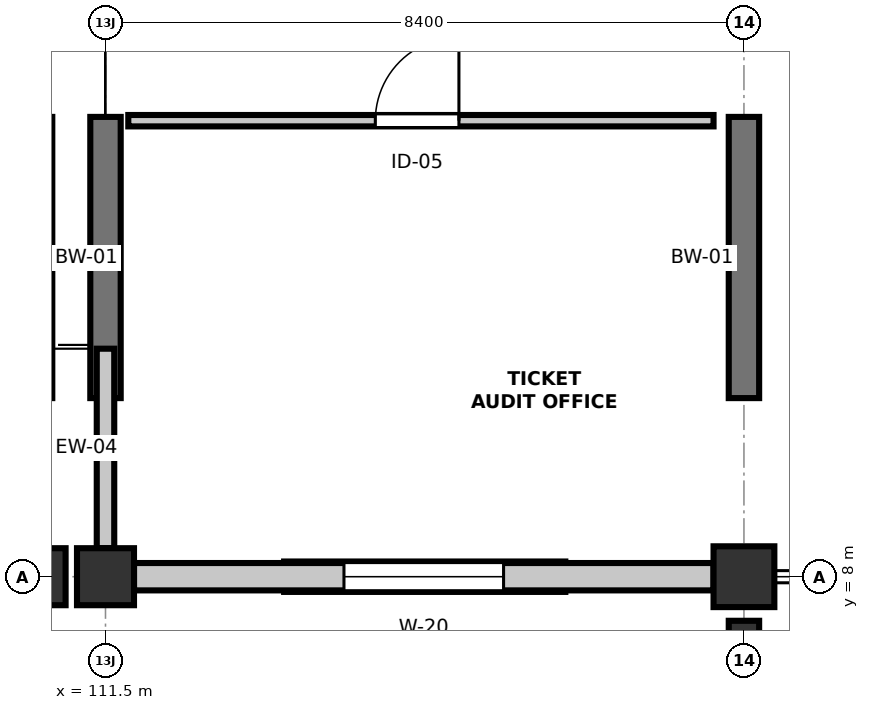
"""IFC4 building model, lengths in metres.
Left out: names, types, materials, properties, quantities, classifications, styles, units other than length and angle.
Written with IfcOpenShell. Run it as: python <this file> out.ifc"""

import sys

from ifc_helpers import new_model, si_unit, direction, frame, frame_2d, origin, origin_2d, place, context, subcontext, project, spatial, rectangle, extrude, element, fill, save


model = new_model("IFC4")
c1 = context("Model", 3, precision=1e-05, world=origin(), true_north=direction((0.0, 1.0)))
c2 = subcontext(c1, "Body", "Model", "MODEL_VIEW")
j1 = project(units=[si_unit("LENGTHUNIT", "METRE"), si_unit("PLANEANGLEUNIT", "RADIAN")], contexts=[c1])
p1 = place(None, origin())
s1 = spatial("IfcSite", under=j1, at=p1, CompositionType="ELEMENT")
p2 = place(p1, origin())
s2 = spatial("IfcBuilding", under=s1, at=p2, CompositionType="ELEMENT")
p3 = place(p2, frame((0.0, 0.0, 4.8)))
s3 = spatial("IfcBuildingStorey", under=s2, at=p3, CompositionType="ELEMENT", Elevation=4.8)
for number, where, z_axis, x_axis in (
    (1, (110.6, 8.0, 0.0), (0.0, 0.0, 1.0), (1.0, 0.0, 0.0)),
    (2, (111.5, 8.0, 0.0), (0.0, 0.0, 1.0), (1.0, 0.0, 0.0)),
):
    element("IfcColumn", number, at=place(p3, frame(where, z_axis=z_axis, x_axis=x_axis)), inside=s3, PredefinedType="COLUMN", context=c2, shape_type="SweptSolid", body=[
        extrude(rectangle(XDim=0.75, YDim=0.75, at=origin_2d()), origin(), (0.0, 0.0, 1.0), 4.8),
    ])
p4 = place(p3, frame((119.9, 8.0, 0.0), z_axis=(0.0, 0.0, 1.0), x_axis=(1.0, 0.0, 0.0)))
e3 = element("IfcColumn", 3, at=p4, inside=s3, PredefinedType="COLUMN", context=c2, shape_type="SweptSolid", body=[
    extrude(rectangle(XDim=0.8, YDim=0.8, at=origin_2d()), origin(), (0.0, 0.0, 1.0), 4.8),
])
p5 = place(p3, frame((119.9, 7.095, 0.0), z_axis=(0.0, 0.0, 1.0), x_axis=(1.0, 0.0, 0.0)))
e4 = element("IfcColumn", 4, at=p5, inside=s3, PredefinedType="PILASTER", context=c2, shape_type="SweptSolid", body=[
    extrude(rectangle(XDim=0.4, YDim=0.65, at=origin_2d()), origin(), (0.0, 0.0, 1.0), 4.8),
])
for number, where, z_axis, x_axis in (
    (5, (113.85, 8.0, -2.1), (0.0, 0.0, 1.0), (1.0, 0.0, 0.0)),
    (6, (111.5, 10.35, -2.1), (0.0, 0.0, 1.0), (0.0, 1.0, 0.0)),
    (7, (119.9, 10.35, -2.1), (0.0, 0.0, 1.0), (0.0, 1.0, 0.0)),
):
    element("IfcWall", number, at=place(p3, frame(where, z_axis=z_axis, x_axis=x_axis)), inside=s3, PredefinedType="SOLIDWALL", context=c2, shape_type="SweptSolid", body=[
        extrude(rectangle(XDim=3.7, YDim=0.4, at=frame_2d((1.85, 0.0))), origin(), (0.0, 0.0, 1.0), 1.85),
    ])
p6 = place(p3, frame((111.875, 8.0, 0.0), z_axis=(0.0, 0.0, 1.0), x_axis=(1.0, 0.0, 0.0)))
e8 = element("IfcWall", 8, at=p6, inside=s3, PredefinedType="STANDARD", context=c2, shape_type="SweptSolid", body=[
    extrude(rectangle(XDim=7.625, YDim=0.36, at=frame_2d((3.812, 0.0))), origin(), (0.0, 0.0, 1.0), 3.785),
])
p7 = place(p6, frame((2.762, 0.0, 0.95)))
e9 = element("IfcOpeningElement", 9, at=p7, cuts=e8, PredefinedType="OPENING", context=c2, shape_type="SweptSolid", body=[
    extrude(rectangle(XDim=2.1, YDim=2.15, at=frame_2d((1.05, 1.075))), frame((0.0, 0.19, 0.0), z_axis=(0.0, -1.0, 0.0), x_axis=(1.0, 0.0, 0.0)), (0.0, 0.0, 1.0), 0.38),
])
p8 = place(p3, frame((111.5, 8.375, 0.0), z_axis=(0.0, 0.0, 1.0), x_axis=(0.0, 1.0, 0.0)))
e10 = element("IfcWall", 10, at=p8, inside=s3, PredefinedType="STANDARD", context=c2, shape_type="SweptSolid", body=[
    extrude(rectangle(XDim=2.625, YDim=0.23, at=frame_2d((1.312, 0.0))), origin(), (0.0, 0.0, 1.0), 3.685),
])
p9 = place(p3, frame((111.8, 14.0, 0.0), z_axis=(0.0, 0.0, 1.0), x_axis=(1.0, 0.0, 0.0)))
e11 = element("IfcWall", 11, at=p9, inside=s3, PredefinedType="PARTITIONING", context=c2, shape_type="SweptSolid", body=[
    extrude(rectangle(XDim=7.7, YDim=0.15, at=frame_2d((3.85, 0.0))), origin(), (0.0, 0.0, 1.0), 3.685),
])
p10 = place(p9, frame((3.25, 0.0, 0.0)))
e12 = element("IfcOpeningElement", 12, at=p10, cuts=e11, PredefinedType="OPENING", context=c2, shape_type="SweptSolid", body=[
    extrude(rectangle(XDim=1.1, YDim=2.15, at=frame_2d((0.55, 1.075))), frame((0.0, 0.085, 0.0), z_axis=(0.0, -1.0, 0.0), x_axis=(1.0, 0.0, 0.0)), (0.0, 0.0, 1.0), 0.17),
])
p11 = place(p7, origin())
e13 = element("IfcWindow", 13, at=p11, inside=s3, PartitioningType="SINGLE_PANEL", PredefinedType="WINDOW", context=c2, shape_type="SweptSolid", body=[
    extrude(rectangle(XDim=2.1, YDim=2.15, at=frame_2d((1.05, 1.075))), frame((0.0, 0.03, 0.0), z_axis=(0.0, -1.0, 0.0), x_axis=(1.0, 0.0, 0.0)), (0.0, 0.0, 1.0), 0.06),
])
fill(e9, e13)
p12 = place(p10, origin())
e14 = element("IfcDoor", 14, at=p12, inside=s3, OperationType="SINGLE_SWING_RIGHT", PredefinedType="DOOR", context=c2, shape_type="SweptSolid", body=[
    extrude(rectangle(XDim=1.1, YDim=2.15, at=frame_2d((0.55, 1.075))), frame((0.0, 0.025, 0.0), z_axis=(0.0, -1.0, 0.0), x_axis=(1.0, 0.0, 0.0)), (0.0, 0.0, 1.0), 0.05),
])
fill(e12, e14)
save(model, sys.argv[1])
